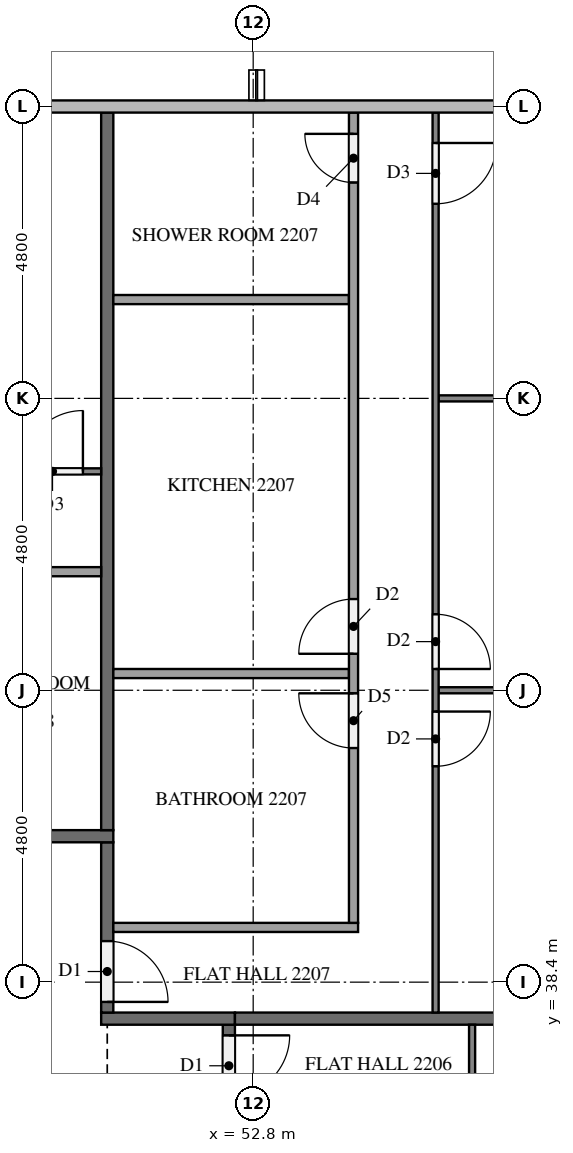
"""IFC4 building model, lengths in metres.
Left out: names, types, materials, properties, quantities, classifications, styles, units other than length and angle.
Written with IfcOpenShell. Run it as: python <this file> out.ifc"""

import sys

from ifc_helpers import new_model, si_unit, direction, frame, frame_2d, origin, place, context, subcontext, project, spatial, rectangle, extrude, element, fill, save


model = new_model("IFC4")
c1 = context("Model", 3, precision=1e-05, world=origin(), true_north=direction((0.0, 1.0)))
c2 = subcontext(c1, "Body", "Model", "MODEL_VIEW")
j1 = project(units=[si_unit("LENGTHUNIT", "METRE"), si_unit("PLANEANGLEUNIT", "RADIAN")], contexts=[c1])
p1 = place(None, origin())
s1 = spatial("IfcSite", under=j1, at=p1, CompositionType="ELEMENT")
p2 = place(p1, origin())
s2 = spatial("IfcBuilding", under=s1, at=p2, CompositionType="ELEMENT")
p3 = place(p2, frame((0.0, 0.0, 89.2)))
s3 = spatial("IfcBuildingStorey", under=s2, at=p3, CompositionType="ELEMENT", Elevation=89.2)
p4 = place(p3, frame((52.4, 37.7, 0.0), z_axis=(0.0, 0.0, 1.0), x_axis=(0.0, -1.0, 0.0)))
e1 = element("IfcWall", 1, at=p4, inside=s3, PredefinedType="PARTITIONING", context=c2, shape_type="SweptSolid", body=[
    extrude(rectangle(XDim=22.6, YDim=0.2, at=frame_2d((11.3, 0.0))), origin(), (0.0, 0.0, 1.0), 3.2),
])
p5 = place(p4, frame((21.425, 0.0, 0.0)))
e2 = element("IfcOpeningElement", 2, at=p5, cuts=e1, PredefinedType="OPENING", context=c2, shape_type="SweptSolid", body=[
    extrude(rectangle(XDim=1.0, YDim=2.1, at=frame_2d((0.5, 1.05))), frame((0.0, 0.11, 0.0), z_axis=(0.0, -1.0, 0.0), x_axis=(1.0, 0.0, 0.0)), (0.0, 0.0, 1.0), 0.22),
])
p6 = place(p4, frame((0.175, 0.0, 0.0)))
e3 = element("IfcOpeningElement", 3, at=p6, cuts=e1, PredefinedType="OPENING", context=c2, shape_type="SweptSolid", body=[
    extrude(rectangle(XDim=1.0, YDim=2.1, at=frame_2d((0.5, 1.05))), frame((0.0, 0.11, 0.0), z_axis=(0.0, -1.0, 0.0), x_axis=(1.0, 0.0, 0.0)), (0.0, 0.0, 1.0), 0.22),
])
p7 = place(p3, frame((52.5, 37.8, 0.0), z_axis=(0.0, 0.0, 1.0), x_axis=(-1.0, 0.0, 0.0)))
e4 = element("IfcWall", 4, at=p7, inside=s3, PredefinedType="PARTITIONING", context=c2, shape_type="SweptSolid", body=[
    extrude(rectangle(XDim=2.2, YDim=0.2, at=frame_2d((1.1, 0.0))), origin(), (0.0, 0.0, 1.0), 3.2),
])
p8 = place(p3, frame((50.4, 40.7, 0.0), z_axis=(0.0, 0.0, 1.0), x_axis=(0.0, -1.0, 0.0)))
e5 = element("IfcWall", 5, at=p8, inside=s3, PredefinedType="PARTITIONING", context=c2, shape_type="SweptSolid", body=[
    extrude(rectangle(XDim=2.8, YDim=0.2, at=frame_2d((1.4, 0.0))), origin(), (0.0, 0.0, 1.0), 3.2),
])
p9 = place(p8, frame((1.625, 0.0, 0.0)))
e6 = element("IfcOpeningElement", 6, at=p9, cuts=e5, PredefinedType="OPENING", context=c2, shape_type="SweptSolid", body=[
    extrude(rectangle(XDim=1.0, YDim=2.1, at=frame_2d((0.5, 1.05))), frame((0.0, 0.11, 0.0), z_axis=(0.0, -1.0, 0.0), x_axis=(1.0, 0.0, 0.0)), (0.0, 0.0, 1.0), 0.22),
])
p10 = place(p3, frame((11.9, 40.8, 0.0), z_axis=(0.0, 0.0, 1.0), x_axis=(1.0, 0.0, 0.0)))
e7 = element("IfcWall", 7, at=p10, inside=s3, PredefinedType="PARTITIONING", context=c2, shape_type="SweptSolid", body=[
    extrude(rectangle(XDim=38.6, YDim=0.2, at=frame_2d((19.3, 0.0))), origin(), (0.0, 0.0, 1.0), 3.2),
])
p11 = place(p10, frame((31.575, 0.0, 0.0)))
e8 = element("IfcOpeningElement", 8, at=p11, cuts=e7, PredefinedType="OPENING", context=c2, shape_type="SweptSolid", body=[
    extrude(rectangle(XDim=1.0, YDim=2.1, at=frame_2d((0.5, 1.05))), frame((0.0, 0.11, 0.0), z_axis=(0.0, -1.0, 0.0), x_axis=(1.0, 0.0, 0.0)), (0.0, 0.0, 1.0), 0.22),
])
p12 = place(p10, frame((14.775, 0.0, 0.0)))
e9 = element("IfcOpeningElement", 9, at=p12, cuts=e7, PredefinedType="OPENING", context=c2, shape_type="SweptSolid", body=[
    extrude(rectangle(XDim=1.0, YDim=2.1, at=frame_2d((0.5, 1.05))), frame((0.0, 0.11, 0.0), z_axis=(0.0, -1.0, 0.0), x_axis=(1.0, 0.0, 0.0)), (0.0, 0.0, 1.0), 0.22),
])
p13 = place(p10, frame((0.375, 0.0, 0.0)))
e10 = element("IfcOpeningElement", 10, at=p13, cuts=e7, PredefinedType="OPENING", context=c2, shape_type="SweptSolid", body=[
    extrude(rectangle(XDim=1.0, YDim=2.1, at=frame_2d((0.5, 1.05))), frame((0.0, 0.11, 0.0), z_axis=(0.0, -1.0, 0.0), x_axis=(1.0, 0.0, 0.0)), (0.0, 0.0, 1.0), 0.22),
])
p14 = place(p3, frame((52.5, 37.8, 0.0), z_axis=(0.0, 0.0, 1.0), x_axis=(1.0, 0.0, 0.0)))
e11 = element("IfcWall", 11, at=p14, inside=s3, PredefinedType="PARTITIONING", context=c2, shape_type="SweptSolid", body=[
    extrude(rectangle(XDim=9.475, YDim=0.2, at=frame_2d((4.738, 0.0))), origin(), (0.0, 0.0, 1.0), 3.2),
])
p15 = place(p3, frame((50.4, 40.9, 0.0), z_axis=(0.0, 0.0, 1.0), x_axis=(0.0, 1.0, 0.0)))
e12 = element("IfcWall", 12, at=p15, inside=s3, PredefinedType="PARTITIONING", context=c2, shape_type="SweptSolid", body=[
    extrude(rectangle(XDim=11.8, YDim=0.2, at=frame_2d((5.9, 0.0))), origin(), (0.0, 0.0, 1.0), 3.2),
])
p16 = place(p3, frame((56.4, 37.7, 0.0), z_axis=(0.0, 0.0, 1.0), x_axis=(0.0, -1.0, 0.0)))
e13 = element("IfcWall", 13, at=p16, inside=s3, PredefinedType="PARTITIONING", context=c2, shape_type="SweptSolid", body=[
    extrude(rectangle(XDim=8.8, YDim=0.1, at=frame_2d((4.4, 0.0))), origin(), (0.0, 0.0, 1.0), 3.2),
])
p17 = place(p16, frame((2.75, 0.0, 0.0)))
e14 = element("IfcOpeningElement", 14, at=p17, cuts=e13, PredefinedType="OPENING", context=c2, shape_type="SweptSolid", body=[
    extrude(rectangle(XDim=1.0, YDim=2.1, at=frame_2d((0.5, 1.05))), frame((0.0, 0.06, 0.0), z_axis=(0.0, -1.0, 0.0), x_axis=(1.0, 0.0, 0.0)), (0.0, 0.0, 1.0), 0.12),
])
p18 = place(p16, frame((4.45, 0.0, 0.0)))
e15 = element("IfcOpeningElement", 15, at=p18, cuts=e13, PredefinedType="OPENING", context=c2, shape_type="SweptSolid", body=[
    extrude(rectangle(XDim=0.9, YDim=2.1, at=frame_2d((0.45, 1.05))), frame((0.0, 0.06, 0.0), z_axis=(0.0, -1.0, 0.0), x_axis=(1.0, 0.0, 0.0)), (0.0, 0.0, 1.0), 0.12),
])
p19 = place(p3, frame((55.85, 43.2, 0.0), z_axis=(0.0, 0.0, 1.0), x_axis=(1.0, 0.0, 0.0)))
e16 = element("IfcWall", 16, at=p19, inside=s3, PredefinedType="PARTITIONING", context=c2, shape_type="SweptSolid", body=[
    extrude(rectangle(XDim=6.45, YDim=0.1, at=frame_2d((3.225, 0.0))), origin(), (0.0, 0.0, 1.0), 3.2),
])
p20 = place(p3, frame((55.85, 48.0, 0.0), z_axis=(0.0, 0.0, 1.0), x_axis=(1.0, 0.0, 0.0)))
e17 = element("IfcWall", 17, at=p20, inside=s3, PredefinedType="PARTITIONING", context=c2, shape_type="SweptSolid", body=[
    extrude(rectangle(XDim=5.975, YDim=0.1, at=frame_2d((2.987, 0.0))), origin(), (0.0, 0.0, 1.0), 3.2),
])
p21 = place(p3, frame((55.8, 52.7, 0.0), z_axis=(0.0, 0.0, 1.0), x_axis=(0.0, -1.0, 0.0)))
e18 = element("IfcWall", 18, at=p21, inside=s3, PredefinedType="PARTITIONING", context=c2, shape_type="SweptSolid", body=[
    extrude(rectangle(XDim=14.8, YDim=0.1, at=frame_2d((7.4, 0.0))), origin(), (0.0, 0.0, 1.0), 3.2),
])
p22 = place(p21, frame((9.85, 0.0, 0.0)))
e19 = element("IfcOpeningElement", 19, at=p22, cuts=e18, PredefinedType="OPENING", context=c2, shape_type="SweptSolid", body=[
    extrude(rectangle(XDim=0.9, YDim=2.1, at=frame_2d((0.45, 1.05))), frame((0.0, 0.06, 0.0), z_axis=(0.0, -1.0, 0.0), x_axis=(1.0, 0.0, 0.0)), (0.0, 0.0, 1.0), 0.12),
])
p23 = place(p21, frame((8.25, 0.0, 0.0)))
e20 = element("IfcOpeningElement", 20, at=p23, cuts=e18, PredefinedType="OPENING", context=c2, shape_type="SweptSolid", body=[
    extrude(rectangle(XDim=0.9, YDim=2.1, at=frame_2d((0.45, 1.05))), frame((0.0, 0.06, 0.0), z_axis=(0.0, -1.0, 0.0), x_axis=(1.0, 0.0, 0.0)), (0.0, 0.0, 1.0), 0.12),
])
p24 = place(p21, frame((0.5, 0.0, 0.0)))
e21 = element("IfcOpeningElement", 21, at=p24, cuts=e18, PredefinedType="OPENING", context=c2, shape_type="SweptSolid", body=[
    extrude(rectangle(XDim=1.0, YDim=2.1, at=frame_2d((0.5, 1.05))), frame((0.0, 0.06, 0.0), z_axis=(0.0, -1.0, 0.0), x_axis=(1.0, 0.0, 0.0)), (0.0, 0.0, 1.0), 0.12),
])
for number, where, z_axis, x_axis in (
    (22, (50.5, 43.475, 0.0), (0.0, 0.0, 1.0), (1.0, 0.0, 0.0)),
    (23, (50.5, 49.625, 0.0), (0.0, 0.0, 1.0), (1.0, 0.0, 0.0)),
):
    element("IfcWall", number, at=place(p3, frame(where, z_axis=z_axis, x_axis=x_axis)), inside=s3, PredefinedType="PARTITIONING", context=c2, shape_type="SweptSolid", body=[
        extrude(rectangle(XDim=3.875, YDim=0.15, at=frame_2d((1.938, 0.0))), origin(), (0.0, 0.0, 1.0), 3.2),
    ])
p25 = place(p3, frame((50.5, 39.3, 0.0), z_axis=(0.0, 0.0, 1.0), x_axis=(1.0, 0.0, 0.0)))
e24 = element("IfcWall", 24, at=p25, inside=s3, PredefinedType="PARTITIONING", context=c2, shape_type="SweptSolid", body=[
    extrude(rectangle(XDim=4.025, YDim=0.15, at=frame_2d((2.012, 0.0))), origin(), (0.0, 0.0, 1.0), 3.2),
])
p26 = place(p3, frame((54.45, 39.375, 0.0), z_axis=(0.0, 0.0, 1.0), x_axis=(0.0, 1.0, 0.0)))
e25 = element("IfcWall", 25, at=p26, inside=s3, PredefinedType="PARTITIONING", context=c2, shape_type="SweptSolid", body=[
    extrude(rectangle(XDim=13.325, YDim=0.15, at=frame_2d((6.663, 0.0))), origin(), (0.0, 0.0, 1.0), 3.2),
])
p27 = place(p26, frame((2.875, 0.0, 0.0)))
e26 = element("IfcOpeningElement", 26, at=p27, cuts=e25, PredefinedType="OPENING", context=c2, shape_type="SweptSolid", body=[
    extrude(rectangle(XDim=0.9, YDim=2.1, at=frame_2d((0.45, 1.05))), frame((0.0, 0.085, 0.0), z_axis=(0.0, -1.0, 0.0), x_axis=(1.0, 0.0, 0.0)), (0.0, 0.0, 1.0), 0.17),
])
p28 = place(p26, frame((4.425, 0.0, 0.0)))
e27 = element("IfcOpeningElement", 27, at=p28, cuts=e25, PredefinedType="OPENING", context=c2, shape_type="SweptSolid", body=[
    extrude(rectangle(XDim=0.9, YDim=2.1, at=frame_2d((0.45, 1.05))), frame((0.0, 0.085, 0.0), z_axis=(0.0, -1.0, 0.0), x_axis=(1.0, 0.0, 0.0)), (0.0, 0.0, 1.0), 0.17),
])
p29 = place(p26, frame((12.175, 0.0, 0.0)))
e28 = element("IfcOpeningElement", 28, at=p29, cuts=e25, PredefinedType="OPENING", context=c2, shape_type="SweptSolid", body=[
    extrude(rectangle(XDim=0.8, YDim=2.1, at=frame_2d((0.4, 1.05))), frame((0.0, 0.085, 0.0), z_axis=(0.0, -1.0, 0.0), x_axis=(1.0, 0.0, 0.0)), (0.0, 0.0, 1.0), 0.17),
])
p30 = place(p3, frame((43.3, 46.8, 0.0), z_axis=(0.0, 0.0, 1.0), x_axis=(1.0, 0.0, 0.0)))
e29 = element("IfcWall", 29, at=p30, inside=s3, PredefinedType="PARTITIONING", context=c2, shape_type="SweptSolid", body=[
    extrude(rectangle(XDim=7.0, YDim=0.1, at=frame_2d((3.5, 0.0))), origin(), (0.0, 0.0, 1.0), 3.2),
])
p31 = place(p30, frame((5.7, 0.0, 0.0)))
e30 = element("IfcOpeningElement", 30, at=p31, cuts=e29, PredefinedType="OPENING", context=c2, shape_type="SweptSolid", body=[
    extrude(rectangle(XDim=1.0, YDim=2.1, at=frame_2d((0.5, 1.05))), frame((0.0, 0.06, 0.0), z_axis=(0.0, -1.0, 0.0), x_axis=(1.0, 0.0, 0.0)), (0.0, 0.0, 1.0), 0.12),
])
p32 = place(p3, frame((50.3, 45.15, 0.0), z_axis=(0.0, 0.0, 1.0), x_axis=(-1.0, 0.0, 0.0)))
e31 = element("IfcWall", 31, at=p32, inside=s3, PredefinedType="PARTITIONING", context=c2, shape_type="SweptSolid", body=[
    extrude(rectangle(XDim=5.525, YDim=0.15, at=frame_2d((2.763, 0.0))), origin(), (0.0, 0.0, 1.0), 3.2),
])
p33 = place(p32, frame((2.535, 0.0, 0.0)))
e32 = element("IfcOpeningElement", 32, at=p33, cuts=e31, PredefinedType="OPENING", context=c2, shape_type="SweptSolid", body=[
    extrude(rectangle(XDim=0.9, YDim=2.1, at=frame_2d((0.45, 1.05))), frame((0.0, 0.085, 0.0), z_axis=(0.0, -1.0, 0.0), x_axis=(1.0, 0.0, 0.0)), (0.0, 0.0, 1.0), 0.17),
])
p34 = place(p32, frame((1.085, 0.0, 0.0)))
e33 = element("IfcOpeningElement", 33, at=p34, cuts=e31, PredefinedType="OPENING", context=c2, shape_type="SweptSolid", body=[
    extrude(rectangle(XDim=0.8, YDim=2.1, at=frame_2d((0.4, 1.05))), frame((0.0, 0.085, 0.0), z_axis=(0.0, -1.0, 0.0), x_axis=(1.0, 0.0, 0.0)), (0.0, 0.0, 1.0), 0.17),
])
p35 = place(p6, origin())
e34 = element("IfcDoor", 34, at=p35, inside=s3, OperationType="SINGLE_SWING_LEFT", PredefinedType="DOOR", context=c2, shape_type="SweptSolid", body=[
    extrude(rectangle(XDim=1.0, YDim=2.1, at=frame_2d((0.5, 1.05))), frame((0.0, 0.025, 0.0), z_axis=(0.0, -1.0, 0.0), x_axis=(1.0, 0.0, 0.0)), (0.0, 0.0, 1.0), 0.05),
])
fill(e3, e34)
p36 = place(p9, origin())
e35 = element("IfcDoor", 35, at=p36, inside=s3, OperationType="SINGLE_SWING_RIGHT", PredefinedType="DOOR", context=c2, shape_type="SweptSolid", body=[
    extrude(rectangle(XDim=1.0, YDim=2.1, at=frame_2d((0.5, 1.05))), frame((0.0, 0.025, 0.0), z_axis=(0.0, -1.0, 0.0), x_axis=(1.0, 0.0, 0.0)), (0.0, 0.0, 1.0), 0.05),
])
fill(e6, e35)
p37 = place(p22, origin())
e36 = element("IfcDoor", 36, at=p37, inside=s3, OperationType="SINGLE_SWING_LEFT", PredefinedType="DOOR", context=c2, shape_type="SweptSolid", body=[
    extrude(rectangle(XDim=0.9, YDim=2.1, at=frame_2d((0.45, 1.05))), frame((0.0, 0.025, 0.0), z_axis=(0.0, -1.0, 0.0), x_axis=(1.0, 0.0, 0.0)), (0.0, 0.0, 1.0), 0.05),
])
fill(e19, e36)
p38 = place(p23, origin())
e37 = element("IfcDoor", 37, at=p38, inside=s3, OperationType="SINGLE_SWING_RIGHT", PredefinedType="DOOR", context=c2, shape_type="SweptSolid", body=[
    extrude(rectangle(XDim=0.9, YDim=2.1, at=frame_2d((0.45, 1.05))), frame((0.0, 0.025, 0.0), z_axis=(0.0, -1.0, 0.0), x_axis=(1.0, 0.0, 0.0)), (0.0, 0.0, 1.0), 0.05),
])
fill(e20, e37)
p39 = place(p24, origin())
e38 = element("IfcDoor", 38, at=p39, inside=s3, OperationType="SINGLE_SWING_LEFT", PredefinedType="DOOR", context=c2, shape_type="SweptSolid", body=[
    extrude(rectangle(XDim=1.0, YDim=2.1, at=frame_2d((0.5, 1.05))), frame((0.0, 0.025, 0.0), z_axis=(0.0, -1.0, 0.0), x_axis=(1.0, 0.0, 0.0)), (0.0, 0.0, 1.0), 0.05),
])
fill(e21, e38)
p40 = place(p27, origin())
e39 = element("IfcDoor", 39, at=p40, inside=s3, OperationType="SINGLE_SWING_RIGHT", PredefinedType="DOOR", context=c2, shape_type="SweptSolid", body=[
    extrude(rectangle(XDim=0.9, YDim=2.1, at=frame_2d((0.45, 1.05))), frame((0.0, 0.025, 0.0), z_axis=(0.0, -1.0, 0.0), x_axis=(1.0, 0.0, 0.0)), (0.0, 0.0, 1.0), 0.05),
])
fill(e26, e39)
p41 = place(p28, origin())
e40 = element("IfcDoor", 40, at=p41, inside=s3, OperationType="SINGLE_SWING_LEFT", PredefinedType="DOOR", context=c2, shape_type="SweptSolid", body=[
    extrude(rectangle(XDim=0.9, YDim=2.1, at=frame_2d((0.45, 1.05))), frame((0.0, 0.025, 0.0), z_axis=(0.0, -1.0, 0.0), x_axis=(1.0, 0.0, 0.0)), (0.0, 0.0, 1.0), 0.05),
])
fill(e27, e40)
p42 = place(p29, origin())
e41 = element("IfcDoor", 41, at=p42, inside=s3, OperationType="SINGLE_SWING_RIGHT", PredefinedType="DOOR", context=c2, shape_type="SweptSolid", body=[
    extrude(rectangle(XDim=0.8, YDim=2.1, at=frame_2d((0.4, 1.05))), frame((0.0, 0.025, 0.0), z_axis=(0.0, -1.0, 0.0), x_axis=(1.0, 0.0, 0.0)), (0.0, 0.0, 1.0), 0.05),
])
fill(e28, e41)
p43 = place(p31, origin())
e42 = element("IfcDoor", 42, at=p43, inside=s3, OperationType="SINGLE_SWING_RIGHT", PredefinedType="DOOR", context=c2, shape_type="SweptSolid", body=[
    extrude(rectangle(XDim=1.0, YDim=2.1, at=frame_2d((0.5, 1.05))), frame((0.0, 0.025, 0.0), z_axis=(0.0, -1.0, 0.0), x_axis=(1.0, 0.0, 0.0)), (0.0, 0.0, 1.0), 0.05),
])
fill(e30, e42)
save(model, sys.argv[1])
